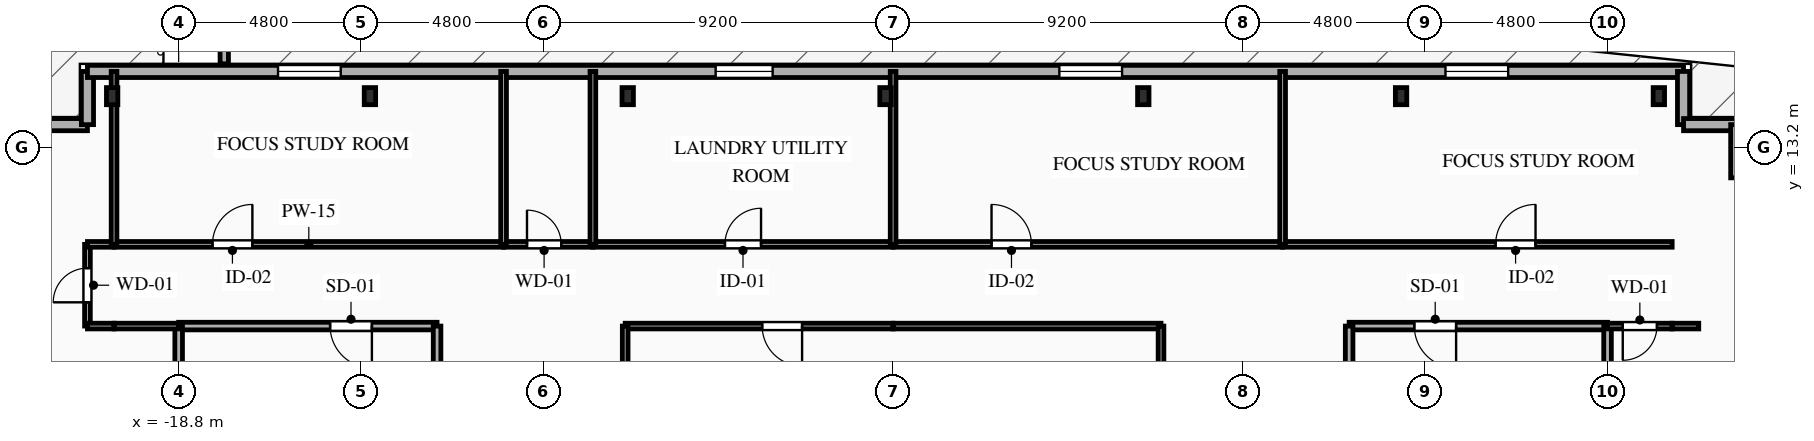
"""IFC4 building model, lengths in metres.
Left out: names, types, materials, properties, quantities, classifications, styles, units other than length and angle.
Written with IfcOpenShell. Run it as: python <this file> out.ifc"""

import sys

from ifc_helpers import new_model, si_unit, direction, frame, frame_2d, origin, origin_2d, place, context, subcontext, project, spatial, rectangle, i_section, extrude, element, fill, save


model = new_model("IFC4")
c1 = context("Model", 3, precision=1e-05, world=origin(), true_north=direction((0.0, 1.0)))
c2 = subcontext(c1, "Body", "Model", "MODEL_VIEW")
j1 = project(units=[si_unit("LENGTHUNIT", "METRE"), si_unit("PLANEANGLEUNIT", "RADIAN")], contexts=[c1])
p1 = place(None, origin())
s1 = spatial("IfcSite", under=j1, at=p1, CompositionType="ELEMENT")
p2 = place(p1, origin())
s2 = spatial("IfcBuilding", under=s1, at=p2, CompositionType="ELEMENT")
p3 = place(p2, frame((0.0, 0.0, 228.3)))
s3 = spatial("IfcBuildingStorey", under=s2, at=p3, CompositionType="ELEMENT", Elevation=228.3)
for number, where, z_axis, x_axis in (
    (1, (20.15, 14.55, 0.0), (0.0, 0.0, 1.0), (1.0, 0.0, 0.0)),
    (2, (13.367, 14.55, 0.0), (0.0, 0.0, 1.0), (1.0, 0.0, 0.0)),
    (3, (6.583, 14.55, 0.0), (0.0, 0.0, 1.0), (1.0, 0.0, 0.0)),
    (4, (-0.2, 14.55, 0.0), (0.0, 0.0, 1.0), (1.0, 0.0, 0.0)),
    (5, (-6.983, 14.55, 0.0), (0.0, 0.0, 1.0), (1.0, 0.0, 0.0)),
    (6, (-13.767, 14.55, 0.0), (0.0, 0.0, 1.0), (1.0, 0.0, 0.0)),
    (7, (-20.55, 14.55, 0.0), (0.0, 0.0, 1.0), (1.0, 0.0, 0.0)),
):
    element("IfcColumn", number, at=place(p3, frame(where, z_axis=z_axis, x_axis=x_axis)), inside=s3, PredefinedType="COLUMN", context=c2, shape_type="SweptSolid", body=[
        extrude(i_section(OverallWidth=0.3, OverallDepth=0.45, WebThickness=0.014, FlangeThickness=0.026, FilletRadius=0.027, at=origin_2d()), origin(), (0.0, 0.0, 1.0), 3.35),
    ])
p4 = place(p3, frame((-22.6, 13.8, 0.0), z_axis=(0.0, 0.0, 1.0), x_axis=(1.0, 0.0, 0.0)))
e8 = element("IfcWall", 8, at=p4, inside=s3, PredefinedType="SOLIDWALL", context=c2, shape_type="SweptSolid", body=[
    extrude(rectangle(XDim=1.4, YDim=0.32, at=frame_2d((0.7, 0.0))), origin(), (0.0, 0.0, 1.0), 3.04),
])
p5 = place(p3, frame((-21.2, 13.8, 0.0), z_axis=(0.0, 0.0, 1.0), x_axis=(0.0, 1.0, 0.0)))
e9 = element("IfcWall", 9, at=p5, inside=s3, PredefinedType="SOLIDWALL", context=c2, shape_type="SweptSolid", body=[
    extrude(rectangle(XDim=1.4, YDim=0.32, at=frame_2d((0.7, 0.0))), origin(), (0.0, 0.0, 1.0), 3.04),
])
p6 = place(p3, frame((-21.2, 15.2, 0.0), z_axis=(0.0, 0.0, 1.0), x_axis=(1.0, 0.0, 0.0)))
e10 = element("IfcWall", 10, at=p6, inside=s3, PredefinedType="SOLIDWALL", context=c2, shape_type="SweptSolid", body=[
    extrude(rectangle(XDim=42.0, YDim=0.32, at=frame_2d((21.0, 0.0))), origin(), (0.0, 0.0, 1.0), 3.04),
])
p7 = place(p6, frame((5.015, 0.0, 0.85)))
e11 = element("IfcOpeningElement", 11, at=p7, cuts=e10, PredefinedType="OPENING", context=c2, shape_type="SweptSolid", body=[
    extrude(rectangle(XDim=1.65, YDim=1.85, at=frame_2d((0.825, 0.925))), frame((0.0, 0.17, 0.0), z_axis=(0.0, -1.0, 0.0), x_axis=(1.0, 0.0, 0.0)), (0.0, 0.0, 1.0), 0.34),
])
p8 = place(p6, frame((16.53, 0.0, 0.85)))
e12 = element("IfcOpeningElement", 12, at=p8, cuts=e10, PredefinedType="OPENING", context=c2, shape_type="SweptSolid", body=[
    extrude(rectangle(XDim=1.5, YDim=1.85, at=frame_2d((0.75, 0.925))), frame((0.0, 0.17, 0.0), z_axis=(0.0, -1.0, 0.0), x_axis=(1.0, 0.0, 0.0)), (0.0, 0.0, 1.0), 0.34),
])
p9 = place(p6, frame((25.575, 0.0, 0.85)))
e13 = element("IfcOpeningElement", 13, at=p9, cuts=e10, PredefinedType="OPENING", context=c2, shape_type="SweptSolid", body=[
    extrude(rectangle(XDim=1.65, YDim=1.85, at=frame_2d((0.825, 0.925))), frame((0.0, 0.17, 0.0), z_axis=(0.0, -1.0, 0.0), x_axis=(1.0, 0.0, 0.0)), (0.0, 0.0, 1.0), 0.34),
])
p10 = place(p6, frame((35.735, 0.0, 0.85)))
e14 = element("IfcOpeningElement", 14, at=p10, cuts=e10, PredefinedType="OPENING", context=c2, shape_type="SweptSolid", body=[
    extrude(rectangle(XDim=1.65, YDim=1.85, at=frame_2d((0.825, 0.925))), frame((0.0, 0.17, 0.0), z_axis=(0.0, -1.0, 0.0), x_axis=(1.0, 0.0, 0.0)), (0.0, 0.0, 1.0), 0.34),
])
for number, where, z_axis, x_axis in (
    (15, (20.8, 15.2, 0.0), (0.0, 0.0, 1.0), (0.0, -1.0, 0.0)),
    (16, (20.8, 13.8, 0.0), (0.0, 0.0, 1.0), (1.0, 0.0, 0.0)),
):
    element("IfcWall", number, at=place(p3, frame(where, z_axis=z_axis, x_axis=x_axis)), inside=s3, PredefinedType="SOLIDWALL", context=c2, shape_type="SweptSolid", body=[
        extrude(rectangle(XDim=1.4, YDim=0.32, at=frame_2d((0.7, 0.0))), origin(), (0.0, 0.0, 1.0), 3.04),
    ])
p11 = place(p3, frame((22.2, 13.8, 0.0), z_axis=(0.0, 0.0, 1.0), x_axis=(0.0, -1.0, 0.0)))
e17 = element("IfcWall", 17, at=p11, inside=s3, PredefinedType="SOLIDWALL", context=c2, shape_type="SweptSolid", body=[
    extrude(rectangle(XDim=1.4, YDim=0.32, at=frame_2d((0.7, 0.0))), origin(), (0.0, 0.0, 1.0), 3.04),
])
p12 = place(p3, frame((-17.6, 19.516, 0.0), z_axis=(0.0, 0.0, 1.0), x_axis=(0.0, -1.0, 0.0)))
e18 = element("IfcWall", 18, at=p12, inside=s3, PredefinedType="PARAPET", context=c2, shape_type="SweptSolid", body=[
    extrude(rectangle(XDim=4.116, YDim=0.22, at=frame_2d((2.058, 0.0))), origin(), (0.0, 0.0, 1.0), 0.65),
])
p13 = place(p3, frame((-12.0, 8.5, 0.0), z_axis=(0.0, 0.0, 1.0), x_axis=(-1.0, 0.0, 0.0)))
e19 = element("IfcWall", 19, at=p13, inside=s3, PredefinedType="PARTITIONING", context=c2, shape_type="SweptSolid", body=[
    extrude(rectangle(XDim=6.8, YDim=0.2, at=frame_2d((3.4, 0.0))), origin(), (0.0, 0.0, 1.0), 3.04),
])
p14 = place(p13, frame((1.715, 0.0, 0.0)))
e20 = element("IfcOpeningElement", 20, at=p14, cuts=e19, PredefinedType="OPENING", context=c2, shape_type="SweptSolid", body=[
    extrude(rectangle(XDim=1.1, YDim=2.15, at=frame_2d((0.55, 1.075))), frame((0.0, 0.11, 0.0), z_axis=(0.0, -1.0, 0.0), x_axis=(1.0, 0.0, 0.0)), (0.0, 0.0, 1.0), 0.22),
])
p15 = place(p3, frame((-12.0, 5.6, 0.0), z_axis=(0.0, 0.0, 1.0), x_axis=(0.0, 1.0, 0.0)))
e21 = element("IfcWall", 21, at=p15, inside=s3, PredefinedType="PARTITIONING", context=c2, shape_type="SweptSolid", body=[
    extrude(rectangle(XDim=2.9, YDim=0.2, at=frame_2d((1.45, 0.0))), origin(), (0.0, 0.0, 1.0), 3.04),
])
p16 = place(p3, frame((-18.8, 8.5, 0.0), z_axis=(0.0, 0.0, 1.0), x_axis=(0.0, -1.0, 0.0)))
e22 = element("IfcWall", 22, at=p16, inside=s3, PredefinedType="PARTITIONING", context=c2, shape_type="SweptSolid", body=[
    extrude(rectangle(XDim=2.9, YDim=0.2, at=frame_2d((1.45, 0.0))), origin(), (0.0, 0.0, 1.0), 2.665),
])
p17 = place(p3, frame((18.8, 8.5, 0.0), z_axis=(0.0, 0.0, 1.0), x_axis=(-1.0, 0.0, 0.0)))
e23 = element("IfcWall", 23, at=p17, inside=s3, PredefinedType="PARTITIONING", context=c2, shape_type="SweptSolid", body=[
    extrude(rectangle(XDim=6.8, YDim=0.2, at=frame_2d((3.4, 0.0))), origin(), (0.0, 0.0, 1.0), 3.04),
])
p18 = place(p17, frame((3.985, 0.0, 0.0)))
e24 = element("IfcOpeningElement", 24, at=p18, cuts=e23, PredefinedType="OPENING", context=c2, shape_type="SweptSolid", body=[
    extrude(rectangle(XDim=1.1, YDim=2.15, at=frame_2d((0.55, 1.075))), frame((0.0, 0.11, 0.0), z_axis=(0.0, -1.0, 0.0), x_axis=(1.0, 0.0, 0.0)), (0.0, 0.0, 1.0), 0.22),
])
p19 = place(p3, frame((12.0, 8.5, 0.0), z_axis=(0.0, 0.0, 1.0), x_axis=(0.0, -1.0, 0.0)))
e25 = element("IfcWall", 25, at=p19, inside=s3, PredefinedType="PARTITIONING", context=c2, shape_type="SweptSolid", body=[
    extrude(rectangle(XDim=2.9, YDim=0.2, at=frame_2d((1.45, 0.0))), origin(), (0.0, 0.0, 1.0), 3.04),
])
p20 = place(p3, frame((18.8, 5.6, 0.0), z_axis=(0.0, 0.0, 1.0), x_axis=(0.0, 1.0, 0.0)))
e26 = element("IfcWall", 26, at=p20, inside=s3, PredefinedType="PARTITIONING", context=c2, shape_type="SweptSolid", body=[
    extrude(rectangle(XDim=2.9, YDim=0.2, at=frame_2d((1.45, 0.0))), origin(), (0.0, 0.0, 1.0), 2.665),
])
p21 = place(p3, frame((-21.2, 8.5, 0.0), z_axis=(0.0, 0.0, 1.0), x_axis=(0.0, 1.0, 0.0)))
e27 = element("IfcWall", 27, at=p21, inside=s3, PredefinedType="PARTITIONING", context=c2, shape_type="SweptSolid", body=[
    extrude(rectangle(XDim=2.15, YDim=0.15, at=frame_2d((1.075, 0.0))), origin(), (0.0, 0.0, 1.0), 2.695),
])
p22 = place(p21, frame((0.625, 0.0, 0.0)))
e28 = element("IfcOpeningElement", 28, at=p22, cuts=e27, PredefinedType="OPENING", context=c2, shape_type="SweptSolid", body=[
    extrude(rectangle(XDim=0.9, YDim=2.1, at=frame_2d((0.45, 1.05))), frame((0.0, 0.085, 0.0), z_axis=(0.0, -1.0, 0.0), x_axis=(1.0, 0.0, 0.0)), (0.0, 0.0, 1.0), 0.17),
])
p23 = place(p3, frame((-18.8, 8.5, 0.0), z_axis=(0.0, 0.0, 1.0), x_axis=(-1.0, 0.0, 0.0)))
e29 = element("IfcWall", 29, at=p23, inside=s3, PredefinedType="PARTITIONING", context=c2, shape_type="SweptSolid", body=[
    extrude(rectangle(XDim=1.7, YDim=0.15, at=frame_2d((0.85, 0.0))), origin(), (0.0, 0.0, 1.0), 3.04),
])
for number, where, z_axis, x_axis in (
    (30, (-20.5, 8.5, 0.0), (0.0, 0.0, 1.0), (-1.0, 0.0, 0.0)),
    (31, (-21.2, 10.65, 0.0), (0.0, 0.0, 1.0), (1.0, 0.0, 0.0)),
):
    element("IfcWall", number, at=place(p3, frame(where, z_axis=z_axis, x_axis=x_axis)), inside=s3, PredefinedType="PARTITIONING", context=c2, shape_type="SweptSolid", body=[
        extrude(rectangle(XDim=0.7, YDim=0.15, at=frame_2d((0.35, 0.0))), origin(), (0.0, 0.0, 1.0), 3.04),
    ])
p24 = place(p3, frame((-20.5, 10.65, 0.0), z_axis=(0.0, 0.0, 1.0), x_axis=(1.0, 0.0, 0.0)))
e32 = element("IfcWall", 32, at=p24, inside=s3, PredefinedType="PARTITIONING", context=c2, shape_type="SweptSolid", body=[
    extrude(rectangle(XDim=10.25, YDim=0.15, at=frame_2d((5.125, 0.0))), origin(), (0.0, 0.0, 1.0), 3.04),
])
p25 = place(p24, frame((2.59, 0.0, 0.0)))
e33 = element("IfcOpeningElement", 33, at=p25, cuts=e32, PredefinedType="OPENING", context=c2, shape_type="SweptSolid", body=[
    extrude(rectangle(XDim=1.05, YDim=2.15, at=frame_2d((0.525, 1.075))), frame((0.0, 0.085, 0.0), z_axis=(0.0, -1.0, 0.0), x_axis=(1.0, 0.0, 0.0)), (0.0, 0.0, 1.0), 0.17),
])
p26 = place(p3, frame((-10.25, 10.65, 0.0), z_axis=(0.0, 0.0, 1.0), x_axis=(1.0, 0.0, 0.0)))
e34 = element("IfcWall", 34, at=p26, inside=s3, PredefinedType="PLUMBINGWALL", context=c2, shape_type="SweptSolid", body=[
    extrude(rectangle(XDim=2.35, YDim=0.15, at=frame_2d((1.175, 0.0))), origin(), (0.0, 0.0, 1.0), 3.04),
])
p27 = place(p26, frame((0.616, 0.0, 0.0)))
e35 = element("IfcOpeningElement", 35, at=p27, cuts=e34, PredefinedType="OPENING", context=c2, shape_type="SweptSolid", body=[
    extrude(rectangle(XDim=0.9, YDim=2.1, at=frame_2d((0.45, 1.05))), frame((0.0, 0.085, 0.0), z_axis=(0.0, -1.0, 0.0), x_axis=(1.0, 0.0, 0.0)), (0.0, 0.0, 1.0), 0.17),
])
p28 = place(p3, frame((-7.9, 10.65, 0.0), z_axis=(0.0, 0.0, 1.0), x_axis=(1.0, 0.0, 0.0)))
e36 = element("IfcWall", 36, at=p28, inside=s3, PredefinedType="PARTITIONING", context=c2, shape_type="SweptSolid", body=[
    extrude(rectangle(XDim=7.9, YDim=0.15, at=frame_2d((3.95, 0.0))), origin(), (0.0, 0.0, 1.0), 3.04),
])
p29 = place(p28, frame((3.475, 0.0, 0.0)))
e37 = element("IfcOpeningElement", 37, at=p29, cuts=e36, PredefinedType="OPENING", context=c2, shape_type="SweptSolid", body=[
    extrude(rectangle(XDim=0.95, YDim=2.1, at=frame_2d((0.475, 1.05))), frame((0.0, 0.085, 0.0), z_axis=(0.0, -1.0, 0.0), x_axis=(1.0, 0.0, 0.0)), (0.0, 0.0, 1.0), 0.17),
])
p30 = place(p3, frame((0.0, 8.5, 0.0), z_axis=(0.0, 0.0, 1.0), x_axis=(-1.0, 0.0, 0.0)))
e38 = element("IfcWall", 38, at=p30, inside=s3, PredefinedType="PARTITIONING", context=c2, shape_type="SweptSolid", body=[
    extrude(rectangle(XDim=7.05, YDim=0.15, at=frame_2d((3.525, 0.0))), origin(), (0.0, 0.0, 1.0), 3.04),
])
p31 = place(p30, frame((2.395, 0.0, 0.0)))
e39 = element("IfcOpeningElement", 39, at=p31, cuts=e38, PredefinedType="OPENING", context=c2, shape_type="SweptSolid", body=[
    extrude(rectangle(XDim=1.05, YDim=2.15, at=frame_2d((0.525, 1.075))), frame((0.0, 0.085, 0.0), z_axis=(0.0, -1.0, 0.0), x_axis=(1.0, 0.0, 0.0)), (0.0, 0.0, 1.0), 0.17),
])
p32 = place(p3, frame((20.5, 8.5, 0.0), z_axis=(0.0, 0.0, 1.0), x_axis=(-1.0, 0.0, 0.0)))
e40 = element("IfcWall", 40, at=p32, inside=s3, PredefinedType="PARTITIONING", context=c2, shape_type="SweptSolid", body=[
    extrude(rectangle(XDim=1.7, YDim=0.15, at=frame_2d((0.85, 0.0))), origin(), (0.0, 0.0, 1.0), 3.04),
])
p33 = place(p32, frame((0.4, 0.0, 0.0)))
e41 = element("IfcOpeningElement", 41, at=p33, cuts=e40, PredefinedType="OPENING", context=c2, shape_type="SweptSolid", body=[
    extrude(rectangle(XDim=0.9, YDim=2.1, at=frame_2d((0.45, 1.05))), frame((0.0, 0.085, 0.0), z_axis=(0.0, -1.0, 0.0), x_axis=(1.0, 0.0, 0.0)), (0.0, 0.0, 1.0), 0.17),
])
p34 = place(p3, frame((21.2, 8.5, 0.0), z_axis=(0.0, 0.0, 1.0), x_axis=(-1.0, 0.0, 0.0)))
e42 = element("IfcWall", 42, at=p34, inside=s3, PredefinedType="PARTITIONING", context=c2, shape_type="SweptSolid", body=[
    extrude(rectangle(XDim=0.7, YDim=0.15, at=frame_2d((0.35, 0.0))), origin(), (0.0, 0.0, 1.0), 3.04),
])
p35 = place(p3, frame((0.0, 10.65, 0.0), z_axis=(0.0, 0.0, 1.0), x_axis=(1.0, 0.0, 0.0)))
e43 = element("IfcWall", 43, at=p35, inside=s3, PredefinedType="PARTITIONING", context=c2, shape_type="SweptSolid", body=[
    extrude(rectangle(XDim=10.25, YDim=0.15, at=frame_2d((5.125, 0.0))), origin(), (0.0, 0.0, 1.0), 3.04),
])
p36 = place(p35, frame((2.59, 0.0, 0.0)))
e44 = element("IfcOpeningElement", 44, at=p36, cuts=e43, PredefinedType="OPENING", context=c2, shape_type="SweptSolid", body=[
    extrude(rectangle(XDim=1.05, YDim=2.15, at=frame_2d((0.525, 1.075))), frame((0.0, 0.085, 0.0), z_axis=(0.0, -1.0, 0.0), x_axis=(1.0, 0.0, 0.0)), (0.0, 0.0, 1.0), 0.17),
])
p37 = place(p3, frame((10.25, 10.65, 0.0), z_axis=(0.0, 0.0, 1.0), x_axis=(1.0, 0.0, 0.0)))
e45 = element("IfcWall", 45, at=p37, inside=s3, PredefinedType="PARTITIONING", context=c2, shape_type="SweptSolid", body=[
    extrude(rectangle(XDim=10.25, YDim=0.15, at=frame_2d((5.125, 0.0))), origin(), (0.0, 0.0, 1.0), 3.04),
])
p38 = place(p37, frame((5.605, 0.0, 0.0)))
e46 = element("IfcOpeningElement", 46, at=p38, cuts=e45, PredefinedType="OPENING", context=c2, shape_type="SweptSolid", body=[
    extrude(rectangle(XDim=1.05, YDim=2.15, at=frame_2d((0.525, 1.075))), frame((0.0, 0.085, 0.0), z_axis=(0.0, -1.0, 0.0), x_axis=(1.0, 0.0, 0.0)), (0.0, 0.0, 1.0), 0.17),
])
for number, where, z_axis, x_axis in (
    (47, (7.05, 8.5, 0.0), (0.0, 0.0, 1.0), (-1.0, 0.0, 0.0)),
    (48, (-7.05, 8.5, 0.0), (0.0, 0.0, 1.0), (0.0, -1.0, 0.0)),
    (49, (7.05, 1.45, 0.0), (0.0, 0.0, 1.0), (0.0, 1.0, 0.0)),
):
    element("IfcWall", number, at=place(p3, frame(where, z_axis=z_axis, x_axis=x_axis)), inside=s3, PredefinedType="PARTITIONING", context=c2, shape_type="SweptSolid", body=[
        extrude(rectangle(XDim=7.05, YDim=0.15, at=frame_2d((3.525, 0.0))), origin(), (0.0, 0.0, 1.0), 3.04),
    ])
p39 = place(p3, frame((-20.5, 15.2, 0.0), z_axis=(0.0, 0.0, 1.0), x_axis=(0.0, -1.0, 0.0)))
e50 = element("IfcWall", 50, at=p39, inside=s3, PredefinedType="PARTITIONING", context=c2, shape_type="SweptSolid", body=[
    extrude(rectangle(XDim=4.55, YDim=0.15, at=frame_2d((2.275, 0.0))), origin(), (0.0, 0.0, 1.0), 2.665),
])
p40 = place(p3, frame((-10.25, 15.2, 0.0), z_axis=(0.0, 0.0, 1.0), x_axis=(0.0, -1.0, 0.0)))
e51 = element("IfcWall", 51, at=p40, inside=s3, PredefinedType="PLUMBINGWALL", context=c2, shape_type="SweptSolid", body=[
    extrude(rectangle(XDim=4.55, YDim=0.15, at=frame_2d((2.275, 0.0))), origin(), (0.0, 0.0, 1.0), 3.04),
])
p41 = place(p3, frame((-7.9, 15.2, 0.0), z_axis=(0.0, 0.0, 1.0), x_axis=(0.0, -1.0, 0.0)))
e52 = element("IfcWall", 52, at=p41, inside=s3, PredefinedType="PLUMBINGWALL", context=c2, shape_type="SweptSolid", body=[
    extrude(rectangle(XDim=4.55, YDim=0.15, at=frame_2d((2.275, 0.0))), origin(), (0.0, 0.0, 1.0), 2.665),
])
for number, where, z_axis, x_axis in (
    (53, (0.0, 15.2, 0.0), (0.0, 0.0, 1.0), (0.0, -1.0, 0.0)),
    (54, (10.25, 15.2, 0.0), (0.0, 0.0, 1.0), (0.0, -1.0, 0.0)),
):
    element("IfcWall", number, at=place(p3, frame(where, z_axis=z_axis, x_axis=x_axis)), inside=s3, PredefinedType="PARTITIONING", context=c2, shape_type="SweptSolid", body=[
        extrude(rectangle(XDim=4.55, YDim=0.15, at=frame_2d((2.275, 0.0))), origin(), (0.0, 0.0, 1.0), 3.04),
    ])
p42 = place(p7, origin())
e55 = element("IfcWindow", 55, at=p42, inside=s3, PartitioningType="SINGLE_PANEL", PredefinedType="WINDOW", context=c2, shape_type="SweptSolid", body=[
    extrude(rectangle(XDim=1.65, YDim=1.85, at=frame_2d((0.825, 0.925))), frame((0.0, 0.03, 0.0), z_axis=(0.0, -1.0, 0.0), x_axis=(1.0, 0.0, 0.0)), (0.0, 0.0, 1.0), 0.06),
])
fill(e11, e55)
p43 = place(p8, origin())
e56 = element("IfcWindow", 56, at=p43, inside=s3, PartitioningType="SINGLE_PANEL", PredefinedType="WINDOW", context=c2, shape_type="SweptSolid", body=[
    extrude(rectangle(XDim=1.5, YDim=1.85, at=frame_2d((0.75, 0.925))), frame((0.0, 0.03, 0.0), z_axis=(0.0, -1.0, 0.0), x_axis=(1.0, 0.0, 0.0)), (0.0, 0.0, 1.0), 0.06),
])
fill(e12, e56)
p44 = place(p9, origin())
e57 = element("IfcWindow", 57, at=p44, inside=s3, PartitioningType="SINGLE_PANEL", PredefinedType="WINDOW", context=c2, shape_type="SweptSolid", body=[
    extrude(rectangle(XDim=1.65, YDim=1.85, at=frame_2d((0.825, 0.925))), frame((0.0, 0.03, 0.0), z_axis=(0.0, -1.0, 0.0), x_axis=(1.0, 0.0, 0.0)), (0.0, 0.0, 1.0), 0.06),
])
fill(e13, e57)
p45 = place(p10, origin())
e58 = element("IfcWindow", 58, at=p45, inside=s3, PartitioningType="SINGLE_PANEL", PredefinedType="WINDOW", context=c2, shape_type="SweptSolid", body=[
    extrude(rectangle(XDim=1.65, YDim=1.85, at=frame_2d((0.825, 0.925))), frame((0.0, 0.03, 0.0), z_axis=(0.0, -1.0, 0.0), x_axis=(1.0, 0.0, 0.0)), (0.0, 0.0, 1.0), 0.06),
])
fill(e14, e58)
p46 = place(p14, origin())
e59 = element("IfcDoor", 59, at=p46, inside=s3, OperationType="SINGLE_SWING_LEFT", PredefinedType="DOOR", context=c2, shape_type="SweptSolid", body=[
    extrude(rectangle(XDim=1.1, YDim=2.15, at=frame_2d((0.55, 1.075))), frame((0.0, 0.025, 0.0), z_axis=(0.0, -1.0, 0.0), x_axis=(1.0, 0.0, 0.0)), (0.0, 0.0, 1.0), 0.05),
])
fill(e20, e59)
p47 = place(p18, origin())
e60 = element("IfcDoor", 60, at=p47, inside=s3, OperationType="SINGLE_SWING_LEFT", PredefinedType="DOOR", context=c2, shape_type="SweptSolid", body=[
    extrude(rectangle(XDim=1.1, YDim=2.15, at=frame_2d((0.55, 1.075))), frame((0.0, 0.025, 0.0), z_axis=(0.0, -1.0, 0.0), x_axis=(1.0, 0.0, 0.0)), (0.0, 0.0, 1.0), 0.05),
])
fill(e24, e60)
p48 = place(p22, origin())
e61 = element("IfcDoor", 61, at=p48, inside=s3, OperationType="SINGLE_SWING_LEFT", PredefinedType="DOOR", context=c2, shape_type="SweptSolid", body=[
    extrude(rectangle(XDim=0.9, YDim=2.1, at=frame_2d((0.45, 1.05))), frame((0.0, 0.025, 0.0), z_axis=(0.0, -1.0, 0.0), x_axis=(1.0, 0.0, 0.0)), (0.0, 0.0, 1.0), 0.05),
])
fill(e28, e61)
p49 = place(p25, origin())
e62 = element("IfcDoor", 62, at=p49, inside=s3, OperationType="SINGLE_SWING_RIGHT", PredefinedType="DOOR", context=c2, shape_type="SweptSolid", body=[
    extrude(rectangle(XDim=1.05, YDim=2.15, at=frame_2d((0.525, 1.075))), frame((0.0, 0.025, 0.0), z_axis=(0.0, -1.0, 0.0), x_axis=(1.0, 0.0, 0.0)), (0.0, 0.0, 1.0), 0.05),
])
fill(e33, e62)
p50 = place(p27, origin())
e63 = element("IfcDoor", 63, at=p50, inside=s3, OperationType="SINGLE_SWING_LEFT", PredefinedType="DOOR", context=c2, shape_type="SweptSolid", body=[
    extrude(rectangle(XDim=0.9, YDim=2.1, at=frame_2d((0.45, 1.05))), frame((0.0, 0.025, 0.0), z_axis=(0.0, -1.0, 0.0), x_axis=(1.0, 0.0, 0.0)), (0.0, 0.0, 1.0), 0.05),
])
fill(e35, e63)
p51 = place(p29, origin())
e64 = element("IfcDoor", 64, at=p51, inside=s3, OperationType="SINGLE_SWING_RIGHT", PredefinedType="DOOR", context=c2, shape_type="SweptSolid", body=[
    extrude(rectangle(XDim=0.95, YDim=2.1, at=frame_2d((0.475, 1.05))), frame((0.0, 0.025, 0.0), z_axis=(0.0, -1.0, 0.0), x_axis=(1.0, 0.0, 0.0)), (0.0, 0.0, 1.0), 0.05),
])
fill(e37, e64)
p52 = place(p31, origin())
e65 = element("IfcDoor", 65, at=p52, inside=s3, OperationType="SINGLE_SWING_LEFT", PredefinedType="DOOR", context=c2, shape_type="SweptSolid", body=[
    extrude(rectangle(XDim=1.05, YDim=2.15, at=frame_2d((0.525, 1.075))), frame((0.0, 0.025, 0.0), z_axis=(0.0, -1.0, 0.0), x_axis=(1.0, 0.0, 0.0)), (0.0, 0.0, 1.0), 0.05),
])
fill(e39, e65)
p53 = place(p33, origin())
e66 = element("IfcDoor", 66, at=p53, inside=s3, OperationType="SINGLE_SWING_RIGHT", PredefinedType="DOOR", context=c2, shape_type="SweptSolid", body=[
    extrude(rectangle(XDim=0.9, YDim=2.1, at=frame_2d((0.45, 1.05))), frame((0.0, 0.025, 0.0), z_axis=(0.0, -1.0, 0.0), x_axis=(1.0, 0.0, 0.0)), (0.0, 0.0, 1.0), 0.05),
])
fill(e41, e66)
p54 = place(p36, origin())
e67 = element("IfcDoor", 67, at=p54, inside=s3, OperationType="SINGLE_SWING_LEFT", PredefinedType="DOOR", context=c2, shape_type="SweptSolid", body=[
    extrude(rectangle(XDim=1.05, YDim=2.15, at=frame_2d((0.525, 1.075))), frame((0.0, 0.025, 0.0), z_axis=(0.0, -1.0, 0.0), x_axis=(1.0, 0.0, 0.0)), (0.0, 0.0, 1.0), 0.05),
])
fill(e44, e67)
p55 = place(p38, origin())
e68 = element("IfcDoor", 68, at=p55, inside=s3, OperationType="SINGLE_SWING_RIGHT", PredefinedType="DOOR", context=c2, shape_type="SweptSolid", body=[
    extrude(rectangle(XDim=1.05, YDim=2.15, at=frame_2d((0.525, 1.075))), frame((0.0, 0.025, 0.0), z_axis=(0.0, -1.0, 0.0), x_axis=(1.0, 0.0, 0.0)), (0.0, 0.0, 1.0), 0.05),
])
fill(e46, e68)
save(model, sys.argv[1])
